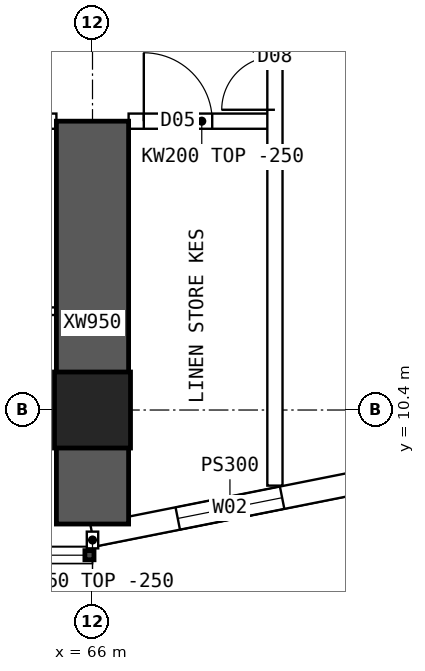
"""IFC4 building model, lengths in metres.
Left out: names, types, materials, properties, quantities, classifications, styles, units other than length and angle.
Written with IfcOpenShell. Run it as: python <this file> out.ifc"""

import sys

from ifc_helpers import new_model, si_unit, direction, frame, frame_2d, origin, origin_2d, place, context, subcontext, project, spatial, polyline, rectangle, hollow_rectangle, outline, extrude, element, fill, save


model = new_model("IFC4")
c1 = context("Model", 3, precision=1e-05, world=origin(), true_north=direction((0.0, 1.0)))
c2 = subcontext(c1, "Body", "Model", "MODEL_VIEW")
j1 = project(units=[si_unit("LENGTHUNIT", "METRE"), si_unit("PLANEANGLEUNIT", "RADIAN")], contexts=[c1])
p1 = place(None, origin())
s1 = spatial("IfcSite", under=j1, at=p1, CompositionType="ELEMENT")
p2 = place(p1, origin())
s2 = spatial("IfcBuilding", under=s1, at=p2, CompositionType="ELEMENT")
p3 = place(p2, frame((0.0, 0.0, 84.4)))
s3 = spatial("IfcBuildingStorey", under=s2, at=p3, CompositionType="ELEMENT", Elevation=84.4)
p4 = place(p3, frame((66.0, 10.4, 0.0), z_axis=(0.0, 0.0, 1.0), x_axis=(1.0, 0.0, 0.0)))
e1 = element("IfcColumn", 1, at=p4, inside=s3, PredefinedType="COLUMN", context=c2, shape_type="SweptSolid", body=[
    extrude(hollow_rectangle(XDim=1.0, YDim=1.0, WallThickness=0.1, at=origin_2d()), origin(), (0.0, 0.0, 1.0), 3.75),
])
p5 = place(p3, frame((66.0, 8.9, 0.0), z_axis=(0.0, 0.0, 1.0), x_axis=(0.0, 1.0, 0.0)))
e2 = element("IfcWall", 2, at=p5, inside=s3, PredefinedType="SHEAR", context=c2, shape_type="SweptSolid", body=[
    extrude(rectangle(XDim=5.3, YDim=0.95, at=frame_2d((2.65, 0.0))), origin(), (0.0, 0.0, 1.0), 3.75),
])
p6 = place(p3, frame((66.0, 8.75, 0.0), z_axis=(0.0, 0.0, 1.0), x_axis=(0.980791473772, 0.195059183267, 0.0)))
e3 = element("IfcWall", 3, at=p6, inside=s3, PredefinedType="SOLIDWALL", context=c2, shape_type="SweptSolid", body=[
    extrude(outline(polyline([(-0.03, -0.15), (3.717, -0.15), (3.657, 0.15), (0.03, 0.15), (-0.03, -0.15)])), origin(), (0.0, 0.0, 1.0), 3.5),
])
p7 = place(p6, frame((1.144, 0.0, 0.9)))
e4 = element("IfcOpeningElement", 4, at=p7, cuts=e3, PredefinedType="OPENING", context=c2, shape_type="SweptSolid", body=[
    extrude(rectangle(XDim=1.4, YDim=1.8, at=frame_2d((0.7, 0.9))), frame((0.0, 0.16, 0.0), z_axis=(0.0, -1.0, 0.0), x_axis=(1.0, 0.0, 0.0)), (0.0, 0.0, 1.0), 0.32),
])
p8 = place(p3, frame((60.475, 14.2, 0.0), z_axis=(0.0, 0.0, 1.0), x_axis=(1.0, 0.0, 0.0)))
e5 = element("IfcWall", 5, at=p8, inside=s3, PredefinedType="SOLIDWALL", context=c2, shape_type="SweptSolid", body=[
    extrude(outline(polyline([(0.0, 0.0), (5.05, 0.0), (5.05, 3.1), (0.0, 3.1), (0.0, 0.0)])), frame((0.0, 0.1, 0.0), z_axis=(0.0, -1.0, 0.0), x_axis=(1.0, 0.0, 0.0)), (0.0, 0.0, 1.0), 0.2),
])
p9 = place(p8, frame((1.45, 0.0, 0.0)))
e6 = element("IfcOpeningElement", 6, at=p9, cuts=e5, PredefinedType="OPENING", context=c2, shape_type="SweptSolid", body=[
    extrude(rectangle(XDim=0.9, YDim=2.1, at=frame_2d((0.45, 1.05))), frame((0.0, 0.11, 0.0), z_axis=(0.0, -1.0, 0.0), x_axis=(1.0, 0.0, 0.0)), (0.0, 0.0, 1.0), 0.22),
])
p10 = place(p8, frame((2.7, 0.0, 0.0)))
e7 = element("IfcOpeningElement", 7, at=p10, cuts=e5, PredefinedType="OPENING", context=c2, shape_type="SweptSolid", body=[
    extrude(rectangle(XDim=0.9, YDim=2.1, at=frame_2d((0.45, 1.05))), frame((0.0, 0.11, 0.0), z_axis=(0.0, -1.0, 0.0), x_axis=(1.0, 0.0, 0.0)), (0.0, 0.0, 1.0), 0.22),
])
p11 = place(p3, frame((66.475, 14.2, 0.0), z_axis=(0.0, 0.0, 1.0), x_axis=(1.0, 0.0, 0.0)))
e8 = element("IfcWall", 8, at=p11, inside=s3, PredefinedType="SOLIDWALL", context=c2, shape_type="SweptSolid", body=[
    extrude(rectangle(XDim=1.925, YDim=0.2, at=frame_2d((0.962, 0.0))), origin(), (0.0, 0.0, 1.0), 3.5),
])
p12 = place(p11, frame((0.2, 0.0, 0.0)))
e9 = element("IfcOpeningElement", 9, at=p12, cuts=e8, PredefinedType="OPENING", context=c2, shape_type="SweptSolid", body=[
    extrude(rectangle(XDim=0.9, YDim=2.1, at=frame_2d((0.45, 1.05))), frame((0.0, 0.11, 0.0), z_axis=(0.0, -1.0, 0.0), x_axis=(1.0, 0.0, 0.0)), (0.0, 0.0, 1.0), 0.22),
])
p13 = place(p3, frame((65.525, 11.7, 0.0), z_axis=(0.0, 0.0, 1.0), x_axis=(-1.0, 0.0, 0.0)))
e10 = element("IfcWall", 10, at=p13, inside=s3, PredefinedType="PARTITIONING", context=c2, shape_type="SweptSolid", body=[
    extrude(rectangle(XDim=1.4, YDim=0.1, at=frame_2d((0.7, 0.0))), origin(), (0.0, 0.0, 1.0), 3.5),
])
p14 = place(p13, frame((0.25, 0.0, 0.0)))
e11 = element("IfcOpeningElement", 11, at=p14, cuts=e10, PredefinedType="OPENING", context=c2, shape_type="SweptSolid", body=[
    extrude(rectangle(XDim=0.9, YDim=2.1, at=frame_2d((0.45, 1.05))), frame((0.0, 0.06, 0.0), z_axis=(0.0, -1.0, 0.0), x_axis=(1.0, 0.0, 0.0)), (0.0, 0.0, 1.0), 0.12),
])
p15 = place(p3, frame((68.4, 9.405, 0.0), z_axis=(0.0, 0.0, 1.0), x_axis=(0.0, 1.0, 0.0)))
e12 = element("IfcWall", 12, at=p15, inside=s3, PredefinedType="SOLIDWALL", context=c2, shape_type="SweptSolid", body=[
    extrude(rectangle(XDim=45.189, YDim=0.2, at=frame_2d((22.595, 0.0))), origin(), (0.0, 0.0, 1.0), 3.5),
])
p16 = place(p15, frame((30.195, 0.0, 0.0)))
e13 = element("IfcOpeningElement", 13, at=p16, cuts=e12, PredefinedType="OPENING", context=c2, shape_type="SweptSolid", body=[
    extrude(rectangle(XDim=1.2, YDim=2.1, at=frame_2d((0.6, 1.05))), frame((0.0, 0.11, 0.0), z_axis=(0.0, -1.0, 0.0), x_axis=(1.0, 0.0, 0.0)), (0.0, 0.0, 1.0), 0.22),
])
p17 = place(p15, frame((4.945, 0.0, 0.0)))
e14 = element("IfcOpeningElement", 14, at=p17, cuts=e12, PredefinedType="OPENING", context=c2, shape_type="SweptSolid", body=[
    extrude(rectangle(XDim=1.4, YDim=2.1, at=frame_2d((0.7, 1.05))), frame((0.0, 0.11, 0.0), z_axis=(0.0, -1.0, 0.0), x_axis=(1.0, 0.0, 0.0)), (0.0, 0.0, 1.0), 0.22),
])
p18 = place(p15, frame((38.745, 0.0, 0.0)))
e15 = element("IfcOpeningElement", 15, at=p18, cuts=e12, PredefinedType="OPENING", context=c2, shape_type="SweptSolid", body=[
    extrude(rectangle(XDim=1.4, YDim=2.1, at=frame_2d((0.7, 1.05))), frame((0.0, 0.11, 0.0), z_axis=(0.0, -1.0, 0.0), x_axis=(1.0, 0.0, 0.0)), (0.0, 0.0, 1.0), 0.22),
])
p19 = place(p3, frame((66.0, 8.8, 0.0), z_axis=(0.0, 0.0, 1.0), x_axis=(0.0, -1.0, 0.0)))
e16 = element("IfcWall", 16, at=p19, inside=s3, PredefinedType="PARTITIONING", context=c2, shape_type="SweptSolid", body=[
    extrude(rectangle(XDim=0.22, YDim=0.15, at=frame_2d((0.11, 0.0))), origin(), (0.0, 0.0, 1.0), 3.5),
])
p20 = place(p7, origin())
e17 = element("IfcWindow", 17, at=p20, inside=s3, PartitioningType="SINGLE_PANEL", PredefinedType="WINDOW", context=c2, shape_type="SweptSolid", body=[
    extrude(rectangle(XDim=1.4, YDim=1.8, at=frame_2d((0.7, 0.9))), frame((0.0, 0.03, 0.0), z_axis=(0.0, -1.0, 0.0), x_axis=(1.0, 0.0, 0.0)), (0.0, 0.0, 1.0), 0.06),
])
fill(e4, e17)
p21 = place(p17, origin())
e18 = element("IfcDoor", 18, at=p21, inside=s3, OperationType="DOUBLE_DOOR_SINGLE_SWING", PredefinedType="DOOR", context=c2, shape_type="SweptSolid", body=[
    extrude(rectangle(XDim=1.4, YDim=2.1, at=frame_2d((0.7, 1.05))), frame((0.0, 0.025, 0.0), z_axis=(0.0, -1.0, 0.0), x_axis=(1.0, 0.0, 0.0)), (0.0, 0.0, 1.0), 0.05),
])
fill(e14, e18)
p22 = place(p12, origin())
e19 = element("IfcDoor", 19, at=p22, inside=s3, OperationType="SINGLE_SWING_LEFT", PredefinedType="DOOR", context=c2, shape_type="SweptSolid", body=[
    extrude(rectangle(XDim=0.9, YDim=2.1, at=frame_2d((0.45, 1.05))), frame((0.0, 0.025, 0.0), z_axis=(0.0, -1.0, 0.0), x_axis=(1.0, 0.0, 0.0)), (0.0, 0.0, 1.0), 0.05),
])
fill(e9, e19)
save(model, sys.argv[1])
